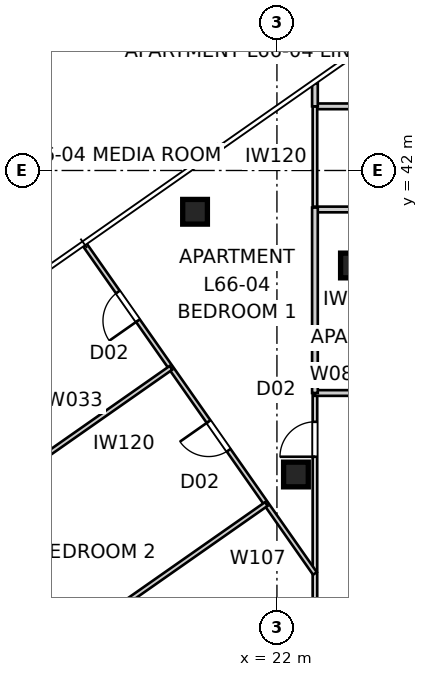
"""IFC4 building model, lengths in metres.
Left out: names, types, materials, properties, quantities, classifications, styles, units other than length and angle.
Written with IfcOpenShell. Run it as: python <this file> out.ifc"""

import sys

from ifc_helpers import new_model, si_unit, direction, frame, frame_2d, origin, origin_2d, place, context, subcontext, project, spatial, rectangle, extrude, element, fill, save


model = new_model("IFC4")
c1 = context("Model", 3, precision=1e-05, world=origin(), true_north=direction((0.0, 1.0)))
c2 = subcontext(c1, "Body", "Model", "MODEL_VIEW")
j1 = project(units=[si_unit("LENGTHUNIT", "METRE"), si_unit("PLANEANGLEUNIT", "RADIAN")], contexts=[c1])
p1 = place(None, origin())
s1 = spatial("IfcSite", under=j1, at=p1, CompositionType="ELEMENT")
p2 = place(p1, origin())
s2 = spatial("IfcBuilding", under=s1, at=p2, CompositionType="ELEMENT")
p3 = place(p2, frame((0.0, 0.0, 240.4)))
s3 = spatial("IfcBuildingStorey", under=s2, at=p3, CompositionType="ELEMENT", Elevation=240.4)
p4 = place(p3, frame((19.845, 40.914, -0.15), z_axis=(0.0, 0.0, 1.0), x_axis=(1.0, 0.0, 0.0)))
e1 = element("IfcColumn", 1, at=p4, inside=s3, PredefinedType="COLUMN", context=c2, shape_type="SweptSolid", body=[
    extrude(rectangle(XDim=0.65, YDim=0.65, at=origin_2d()), origin(), (0.0, 0.0, 1.0), 3.55),
])
for number, where, z_axis, x_axis in (
    (2, (24.0, 39.5, 0.0), (0.0, 0.0, 1.0), (1.0, 0.0, 0.0)),
    (3, (22.5, 34.0, 0.0), (0.0, 0.0, 1.0), (1.0, 0.0, 0.0)),
):
    element("IfcColumn", number, at=place(p3, frame(where, z_axis=z_axis, x_axis=x_axis)), inside=s3, PredefinedType="COLUMN", context=c2, shape_type="SweptSolid", body=[
        extrude(rectangle(XDim=0.65, YDim=0.65, at=origin_2d()), origin(), (0.0, 0.0, 1.0), 3.4),
    ])
p5 = place(p3, frame((23.0, 16.864, 0.0), z_axis=(0.0, 0.0, 1.0), x_axis=(0.0, 1.0, 0.0)))
e4 = element("IfcWall", 4, at=p5, inside=s3, PredefinedType="PARTITIONING", context=c2, shape_type="SweptSolid", body=[
    extrude(rectangle(XDim=19.28, YDim=0.12, at=frame_2d((9.64, 0.0))), origin(), (0.0, 0.0, 1.0), 2.55),
])
p6 = place(p5, frame((9.599, 0.0, 0.0)))
e5 = element("IfcOpeningElement", 5, at=p6, cuts=e4, PredefinedType="OPENING", context=c2, shape_type="SweptSolid", body=[
    extrude(rectangle(XDim=0.92, YDim=2.34, at=frame_2d((0.46, 1.17))), frame((0.0, 0.07, 0.0), z_axis=(0.0, -1.0, 0.0), x_axis=(1.0, 0.0, 0.0)), (0.0, 0.0, 1.0), 0.14),
])
p7 = place(p5, frame((17.603, 0.0, 0.0)))
e6 = element("IfcOpeningElement", 6, at=p7, cuts=e4, PredefinedType="OPENING", context=c2, shape_type="SweptSolid", body=[
    extrude(rectangle(XDim=0.92, YDim=2.34, at=frame_2d((0.46, 1.17))), frame((0.0, 0.07, 0.0), z_axis=(0.0, -1.0, 0.0), x_axis=(1.0, 0.0, 0.0)), (0.0, 0.0, 1.0), 0.14),
])
p8 = place(p5, frame((12.806, 0.0, 0.0)))
e7 = element("IfcOpeningElement", 7, at=p8, cuts=e4, PredefinedType="OPENING", context=c2, shape_type="SweptSolid", body=[
    extrude(rectangle(XDim=0.92, YDim=2.34, at=frame_2d((0.46, 1.17))), frame((0.0, 0.07, 0.0), z_axis=(0.0, -1.0, 0.0), x_axis=(1.0, 0.0, 0.0)), (0.0, 0.0, 1.0), 0.14),
])
p9 = place(p3, frame((23.0, 36.145, 0.0), z_axis=(0.0, 0.0, 1.0), x_axis=(1.0, 0.0, 0.0)))
e8 = element("IfcWall", 8, at=p9, inside=s3, PredefinedType="SOLIDWALL", context=c2, shape_type="SweptSolid", body=[
    extrude(rectangle(XDim=4.9, YDim=0.15, at=frame_2d((2.45, 0.0))), origin(), (0.0, 0.0, 1.0), 3.25),
])
p10 = place(p9, frame((1.99, 0.0, 0.0)))
e9 = element("IfcOpeningElement", 9, at=p10, cuts=e8, PredefinedType="OPENING", context=c2, shape_type="SweptSolid", body=[
    extrude(rectangle(XDim=0.92, YDim=2.34, at=frame_2d((0.46, 1.17))), frame((0.0, 0.085, 0.0), z_axis=(0.0, -1.0, 0.0), x_axis=(1.0, 0.0, 0.0)), (0.0, 0.0, 1.0), 0.17),
])
p11 = place(p3, frame((23.0, 43.688, 0.0), z_axis=(0.0, 0.0, 1.0), x_axis=(1.0, 0.0, 0.0)))
e10 = element("IfcWall", 10, at=p11, inside=s3, PredefinedType="SOLIDWALL", context=c2, shape_type="SweptSolid", body=[
    extrude(rectangle(XDim=5.708, YDim=0.15, at=frame_2d((2.854, 0.0))), origin(), (0.0, 0.0, 1.0), 3.25),
])
p12 = place(p11, frame((2.374, 0.0, 0.0)))
e11 = element("IfcOpeningElement", 11, at=p12, cuts=e10, PredefinedType="OPENING", context=c2, shape_type="SweptSolid", body=[
    extrude(rectangle(XDim=0.96, YDim=2.1, at=frame_2d((0.48, 1.05))), frame((0.0, 0.085, 0.0), z_axis=(0.0, -1.0, 0.0), x_axis=(1.0, 0.0, 0.0)), (0.0, 0.0, 1.0), 0.17),
])
p13 = place(p3, frame((23.0, 41.024, 0.0), z_axis=(0.0, 0.0, 1.0), x_axis=(0.0, 1.0, 0.0)))
e12 = element("IfcWall", 12, at=p13, inside=s3, PredefinedType="PARTITIONING", context=c2, shape_type="SweptSolid", body=[
    extrude(rectangle(XDim=2.665, YDim=0.12, at=frame_2d((1.332, 0.0))), origin(), (0.0, 0.0, 1.0), 3.25),
])
p14 = place(p3, frame((27.9, 40.974, 0.0), z_axis=(0.0, 0.0, 1.0), x_axis=(-1.0, 0.0, 0.0)))
e13 = element("IfcWall", 13, at=p14, inside=s3, PredefinedType="SOLIDWALL", context=c2, shape_type="SweptSolid", body=[
    extrude(rectangle(XDim=4.9, YDim=0.15, at=frame_2d((2.45, 0.0))), origin(), (0.0, 0.0, 1.0), 3.25),
])
p15 = place(p14, frame((1.97, 0.0, 0.0)))
e14 = element("IfcOpeningElement", 14, at=p15, cuts=e13, PredefinedType="OPENING", context=c2, shape_type="SweptSolid", body=[
    extrude(rectangle(XDim=0.96, YDim=2.1, at=frame_2d((0.48, 1.05))), frame((0.0, 0.085, 0.0), z_axis=(0.0, -1.0, 0.0), x_axis=(1.0, 0.0, 0.0)), (0.0, 0.0, 1.0), 0.17),
])
p16 = place(p3, frame((23.0, 43.688, 0.0), z_axis=(0.0, 0.0, 1.0), x_axis=(0.0, 1.0, 0.0)))
e15 = element("IfcWall", 15, at=p16, inside=s3, PredefinedType="SOLIDWALL", context=c2, shape_type="SweptSolid", body=[
    extrude(rectangle(XDim=0.606, YDim=0.15, at=frame_2d((0.303, 0.0))), origin(), (0.0, 0.0, 1.0), 3.25),
])
p17 = place(p3, frame((23.0, 31.396, 0.0), z_axis=(0.0, 0.0, 1.0), x_axis=(-0.573575545802, 0.819152667857, 0.0)))
e16 = element("IfcWall", 16, at=p17, inside=s3, PredefinedType="PARTITIONING", context=c2, shape_type="SweptSolid", body=[
    extrude(rectangle(XDim=10.566, YDim=0.12, at=frame_2d((5.283, 0.0))), origin(), (0.0, 0.0, 1.0), 3.25),
])
p18 = place(p17, frame((3.958, 0.0, 0.0)))
e17 = element("IfcOpeningElement", 17, at=p18, cuts=e16, PredefinedType="OPENING", context=c2, shape_type="SweptSolid", body=[
    extrude(rectangle(XDim=0.92, YDim=2.34, at=frame_2d((0.46, 1.17))), frame((0.0, 0.07, 0.0), z_axis=(0.0, -1.0, 0.0), x_axis=(1.0, 0.0, 0.0)), (0.0, 0.0, 1.0), 0.14),
])
p19 = place(p17, frame((8.121, 0.0, 0.0)))
e18 = element("IfcOpeningElement", 18, at=p19, cuts=e16, PredefinedType="OPENING", context=c2, shape_type="SweptSolid", body=[
    extrude(rectangle(XDim=0.92, YDim=2.34, at=frame_2d((0.46, 1.17))), frame((0.0, 0.07, 0.0), z_axis=(0.0, -1.0, 0.0), x_axis=(1.0, 0.0, 0.0)), (0.0, 0.0, 1.0), 0.14),
])
p20 = place(p3, frame((23.0, 41.024, 0.0), z_axis=(0.0, 0.0, 1.0), x_axis=(0.0, -1.0, 0.0)))
e19 = element("IfcWall", 19, at=p20, inside=s3, PredefinedType="SOLIDWALL", context=c2, shape_type="SweptSolid", body=[
    extrude(rectangle(XDim=4.879, YDim=0.15, at=frame_2d((2.44, 0.0))), origin(), (0.0, 0.0, 1.0), 3.25),
])
p21 = place(p3, frame((21.72, 33.223, 0.0), z_axis=(0.0, 0.0, 1.0), x_axis=(-0.819152099525, -0.573576357466, 0.0)))
e20 = element("IfcWall", 20, at=p21, inside=s3, PredefinedType="PARTITIONING", context=c2, shape_type="SweptSolid", body=[
    extrude(rectangle(XDim=8.335, YDim=0.12, at=frame_2d((4.167, 0.0))), origin(), (0.0, 0.0, 1.0), 3.25),
])
p22 = place(p3, frame((15.66, 34.321, 0.0), z_axis=(0.0, 0.0, 1.0), x_axis=(0.819165768115, 0.573556836197, 0.0)))
e21 = element("IfcWall", 21, at=p22, inside=s3, PredefinedType="PARTITIONING", context=c2, shape_type="SweptSolid", body=[
    extrude(rectangle(XDim=4.335, YDim=0.12, at=frame_2d((2.167, 0.0))), origin(), (0.0, 0.0, 1.0), 3.25),
])
p23 = place(p7, origin())
e22 = element("IfcDoor", 22, at=p23, inside=s3, OperationType="SINGLE_SWING_LEFT", PredefinedType="DOOR", context=c2, shape_type="SweptSolid", body=[
    extrude(rectangle(XDim=0.92, YDim=2.34, at=frame_2d((0.46, 1.17))), frame((0.0, 0.025, 0.0), z_axis=(0.0, -1.0, 0.0), x_axis=(1.0, 0.0, 0.0)), (0.0, 0.0, 1.0), 0.05),
])
fill(e6, e22)
p24 = place(p18, origin())
e23 = element("IfcDoor", 23, at=p24, inside=s3, OperationType="SINGLE_SWING_RIGHT", PredefinedType="DOOR", context=c2, shape_type="SweptSolid", body=[
    extrude(rectangle(XDim=0.92, YDim=2.34, at=frame_2d((0.46, 1.17))), frame((0.0, 0.025, 0.0), z_axis=(0.0, -1.0, 0.0), x_axis=(1.0, 0.0, 0.0)), (0.0, 0.0, 1.0), 0.05),
])
fill(e17, e23)
p25 = place(p19, origin())
e24 = element("IfcDoor", 24, at=p25, inside=s3, OperationType="SINGLE_SWING_LEFT", PredefinedType="DOOR", context=c2, shape_type="SweptSolid", body=[
    extrude(rectangle(XDim=0.92, YDim=2.34, at=frame_2d((0.46, 1.17))), frame((0.0, 0.025, 0.0), z_axis=(0.0, -1.0, 0.0), x_axis=(1.0, 0.0, 0.0)), (0.0, 0.0, 1.0), 0.05),
])
fill(e18, e24)
save(model, sys.argv[1])
